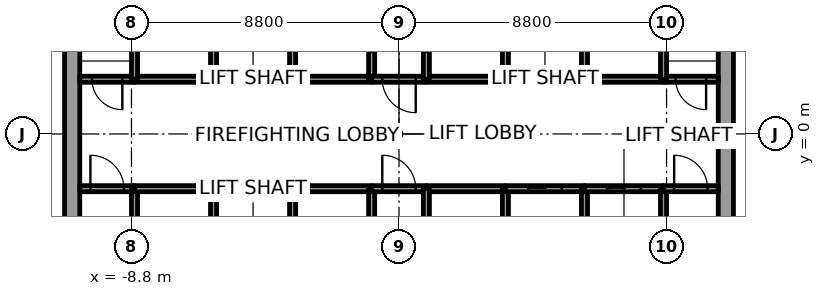
"""IFC4 building model, lengths in metres.
Left out: names, types, materials, properties, quantities, classifications, styles, units other than length and angle.
Written with IfcOpenShell. Run it as: python <this file> out.ifc"""

import sys

from ifc_helpers import new_model, si_unit, direction, frame, frame_2d, origin, place, context, subcontext, project, spatial, rectangle, extrude, element, fill, save


model = new_model("IFC4")
c1 = context("Model", 3, precision=1e-05, world=origin(), true_north=direction((0.0, 1.0)))
c2 = subcontext(c1, "Body", "Model", "MODEL_VIEW")
j1 = project(units=[si_unit("LENGTHUNIT", "METRE"), si_unit("PLANEANGLEUNIT", "RADIAN")], contexts=[c1])
p1 = place(None, origin())
s1 = spatial("IfcSite", under=j1, at=p1, CompositionType="ELEMENT")
p2 = place(p1, origin())
s2 = spatial("IfcBuilding", under=s1, at=p2, CompositionType="ELEMENT")
p3 = place(p2, frame((0.0, 0.0, -4.5)))
s3 = spatial("IfcBuildingStorey", under=s2, at=p3, CompositionType="ELEMENT", Elevation=-4.5)
for number, where, z_axis, x_axis in (
    (1, (-10.75, -7.5, 0.0), (0.0, 0.0, 1.0), (0.0, 1.0, 0.0)),
    (2, (10.75, -7.5, 0.0), (0.0, 0.0, 1.0), (0.0, 1.0, 0.0)),
):
    element("IfcWall", number, at=place(p3, frame(where, z_axis=z_axis, x_axis=x_axis)), inside=s3, PredefinedType="SHEAR", context=c2, shape_type="SweptSolid", body=[
        extrude(rectangle(XDim=15.0, YDim=0.5, at=frame_2d((7.5, 0.0))), origin(), (0.0, 0.0, 1.0), 4.5),
    ])
p4 = place(p3, frame((-10.5, -1.8, 0.0), z_axis=(0.0, 0.0, 1.0), x_axis=(1.0, 0.0, 0.0)))
e3 = element("IfcWall", 3, at=p4, inside=s3, PredefinedType="SOLIDWALL", context=c2, shape_type="SweptSolid", body=[
    extrude(rectangle(XDim=1.8, YDim=0.2, at=frame_2d((0.9, 0.0))), origin(), (0.0, 0.0, 1.0), 4.25),
])
p5 = place(p4, frame((0.35, 0.0, 0.0)))
e4 = element("IfcOpeningElement", 4, at=p5, cuts=e3, PredefinedType="OPENING", context=c2, shape_type="SweptSolid", body=[
    extrude(rectangle(XDim=1.1, YDim=2.4, at=frame_2d((0.55, 1.2))), frame((0.0, 0.1, 0.0), z_axis=(0.0, -1.0, 0.0), x_axis=(1.0, 0.0, 0.0)), (0.0, 0.0, 1.0), 0.2),
])
p6 = place(p3, frame((-8.7, 1.8, 0.0), z_axis=(0.0, 0.0, 1.0), x_axis=(-1.0, 0.0, 0.0)))
e5 = element("IfcWall", 5, at=p6, inside=s3, PredefinedType="SOLIDWALL", context=c2, shape_type="SweptSolid", body=[
    extrude(rectangle(XDim=1.8, YDim=0.2, at=frame_2d((0.9, 0.0))), origin(), (0.0, 0.0, 1.0), 4.25),
])
p7 = place(p6, frame((0.4, 0.0, 0.0)))
e6 = element("IfcOpeningElement", 6, at=p7, cuts=e5, PredefinedType="OPENING", context=c2, shape_type="SweptSolid", body=[
    extrude(rectangle(XDim=1.0, YDim=2.4, at=frame_2d((0.5, 1.2))), frame((0.0, 0.1, 0.0), z_axis=(0.0, -1.0, 0.0), x_axis=(1.0, 0.0, 0.0)), (0.0, 0.0, 1.0), 0.2),
])
p8 = place(p3, frame((-8.7, -4.6, 0.0), z_axis=(0.0, 0.0, 1.0), x_axis=(0.0, 1.0, 0.0)))
e7 = element("IfcWall", 7, at=p8, inside=s3, PredefinedType="SOLIDWALL", context=c2, shape_type="SweptSolid", body=[
    extrude(rectangle(XDim=2.8, YDim=0.2, at=frame_2d((1.4, 0.0))), origin(), (0.0, 0.0, 1.0), 4.25),
])
for number, where, z_axis, x_axis in (
    (8, (-8.7, -1.8, 0.0), (0.0, 0.0, 1.0), (1.0, 0.0, 0.0)),
    (9, (-6.1, 1.8, 0.0), (0.0, 0.0, 1.0), (-1.0, 0.0, 0.0)),
):
    element("IfcWall", number, at=place(p3, frame(where, z_axis=z_axis, x_axis=x_axis)), inside=s3, PredefinedType="SOLIDWALL", context=c2, shape_type="SweptSolid", body=[
        extrude(rectangle(XDim=2.6, YDim=0.2, at=frame_2d((1.3, 0.0))), origin(), (0.0, 0.0, 1.0), 4.25),
    ])
for number, where, z_axis, x_axis in (
    (10, (-8.7, 1.8, 0.0), (0.0, 0.0, 1.0), (0.0, 1.0, 0.0)),
    (11, (-6.1, -4.6, 0.0), (0.0, 0.0, 1.0), (0.0, 1.0, 0.0)),
):
    element("IfcWall", number, at=place(p3, frame(where, z_axis=z_axis, x_axis=x_axis)), inside=s3, PredefinedType="SOLIDWALL", context=c2, shape_type="SweptSolid", body=[
        extrude(rectangle(XDim=2.8, YDim=0.2, at=frame_2d((1.4, 0.0))), origin(), (0.0, 0.0, 1.0), 4.25),
    ])
for number, where, z_axis, x_axis in (
    (12, (-6.1, -1.8, 0.0), (0.0, 0.0, 1.0), (1.0, 0.0, 0.0)),
    (13, (-3.5, 1.8, 0.0), (0.0, 0.0, 1.0), (-1.0, 0.0, 0.0)),
):
    element("IfcWall", number, at=place(p3, frame(where, z_axis=z_axis, x_axis=x_axis)), inside=s3, PredefinedType="SOLIDWALL", context=c2, shape_type="SweptSolid", body=[
        extrude(rectangle(XDim=2.6, YDim=0.2, at=frame_2d((1.3, 0.0))), origin(), (0.0, 0.0, 1.0), 4.25),
    ])
for number, where, z_axis, x_axis in (
    (14, (-6.1, 1.8, 0.0), (0.0, 0.0, 1.0), (0.0, 1.0, 0.0)),
    (15, (-3.5, -4.6, 0.0), (0.0, 0.0, 1.0), (0.0, 1.0, 0.0)),
):
    element("IfcWall", number, at=place(p3, frame(where, z_axis=z_axis, x_axis=x_axis)), inside=s3, PredefinedType="SOLIDWALL", context=c2, shape_type="SweptSolid", body=[
        extrude(rectangle(XDim=2.8, YDim=0.2, at=frame_2d((1.4, 0.0))), origin(), (0.0, 0.0, 1.0), 4.25),
    ])
for number, where, z_axis, x_axis in (
    (16, (-3.5, -1.8, 0.0), (0.0, 0.0, 1.0), (1.0, 0.0, 0.0)),
    (17, (-0.9, 1.8, 0.0), (0.0, 0.0, 1.0), (-1.0, 0.0, 0.0)),
):
    element("IfcWall", number, at=place(p3, frame(where, z_axis=z_axis, x_axis=x_axis)), inside=s3, PredefinedType="SOLIDWALL", context=c2, shape_type="SweptSolid", body=[
        extrude(rectangle(XDim=2.6, YDim=0.2, at=frame_2d((1.3, 0.0))), origin(), (0.0, 0.0, 1.0), 4.25),
    ])
p9 = place(p3, frame((-3.5, 4.6, 0.0), z_axis=(0.0, 0.0, 1.0), x_axis=(0.0, -1.0, 0.0)))
e18 = element("IfcWall", 18, at=p9, inside=s3, PredefinedType="SOLIDWALL", context=c2, shape_type="SweptSolid", body=[
    extrude(rectangle(XDim=2.8, YDim=0.2, at=frame_2d((1.4, 0.0))), origin(), (0.0, 0.0, 1.0), 4.25),
])
p10 = place(p3, frame((-0.9, 1.8, 0.0), z_axis=(0.0, 0.0, 1.0), x_axis=(0.0, 1.0, 0.0)))
e19 = element("IfcWall", 19, at=p10, inside=s3, PredefinedType="SOLIDWALL", context=c2, shape_type="SweptSolid", body=[
    extrude(rectangle(XDim=3.0, YDim=0.2, at=frame_2d((1.5, 0.0))), origin(), (0.0, 0.0, 1.0), 4.25),
])
p11 = place(p10, frame((0.9, 0.0, 0.0)))
e20 = element("IfcOpeningElement", 20, at=p11, cuts=e19, PredefinedType="OPENING", context=c2, shape_type="SweptSolid", body=[
    extrude(rectangle(XDim=1.2, YDim=2.1, at=frame_2d((0.6, 1.05))), frame((0.0, 0.1, 0.0), z_axis=(0.0, -1.0, 0.0), x_axis=(1.0, 0.0, 0.0)), (0.0, 0.0, 1.0), 0.2),
])
p12 = place(p3, frame((-0.9, -4.6, 0.0), z_axis=(0.0, 0.0, 1.0), x_axis=(0.0, 1.0, 0.0)))
e21 = element("IfcWall", 21, at=p12, inside=s3, PredefinedType="SOLIDWALL", context=c2, shape_type="SweptSolid", body=[
    extrude(rectangle(XDim=2.8, YDim=0.2, at=frame_2d((1.4, 0.0))), origin(), (0.0, 0.0, 1.0), 4.25),
])
p13 = place(p3, frame((-0.9, -1.8, 0.0), z_axis=(0.0, 0.0, 1.0), x_axis=(1.0, 0.0, 0.0)))
e22 = element("IfcWall", 22, at=p13, inside=s3, PredefinedType="SOLIDWALL", context=c2, shape_type="SweptSolid", body=[
    extrude(rectangle(XDim=1.8, YDim=0.2, at=frame_2d((0.9, 0.0))), origin(), (0.0, 0.0, 1.0), 4.25),
])
p14 = place(p13, frame((0.35, 0.0, 0.0)))
e23 = element("IfcOpeningElement", 23, at=p14, cuts=e22, PredefinedType="OPENING", context=c2, shape_type="SweptSolid", body=[
    extrude(rectangle(XDim=1.1, YDim=2.4, at=frame_2d((0.55, 1.2))), frame((0.0, 0.1, 0.0), z_axis=(0.0, -1.0, 0.0), x_axis=(1.0, 0.0, 0.0)), (0.0, 0.0, 1.0), 0.2),
])
p15 = place(p3, frame((0.9, 1.8, 0.0), z_axis=(0.0, 0.0, 1.0), x_axis=(-1.0, 0.0, 0.0)))
e24 = element("IfcWall", 24, at=p15, inside=s3, PredefinedType="SOLIDWALL", context=c2, shape_type="SweptSolid", body=[
    extrude(rectangle(XDim=1.8, YDim=0.2, at=frame_2d((0.9, 0.0))), origin(), (0.0, 0.0, 1.0), 4.25),
])
p16 = place(p15, frame((0.35, 0.0, 0.0)))
e25 = element("IfcOpeningElement", 25, at=p16, cuts=e24, PredefinedType="OPENING", context=c2, shape_type="SweptSolid", body=[
    extrude(rectangle(XDim=1.1, YDim=2.4, at=frame_2d((0.55, 1.2))), frame((0.0, 0.1, 0.0), z_axis=(0.0, -1.0, 0.0), x_axis=(1.0, 0.0, 0.0)), (0.0, 0.0, 1.0), 0.2),
])
p17 = place(p3, frame((0.9, -1.8, 0.0), z_axis=(0.0, 0.0, 1.0), x_axis=(1.0, 0.0, 0.0)))
e26 = element("IfcWall", 26, at=p17, inside=s3, PredefinedType="SOLIDWALL", context=c2, shape_type="SweptSolid", body=[
    extrude(rectangle(XDim=2.6, YDim=0.2, at=frame_2d((1.3, 0.0))), origin(), (0.0, 0.0, 1.0), 4.25),
])
p18 = place(p3, frame((0.9, -1.8, 0.0), z_axis=(0.0, 0.0, 1.0), x_axis=(0.0, -1.0, 0.0)))
e27 = element("IfcWall", 27, at=p18, inside=s3, PredefinedType="SOLIDWALL", context=c2, shape_type="SweptSolid", body=[
    extrude(rectangle(XDim=2.8, YDim=0.2, at=frame_2d((1.4, 0.0))), origin(), (0.0, 0.0, 1.0), 4.25),
])
p19 = place(p3, frame((3.5, 1.8, 0.0), z_axis=(0.0, 0.0, 1.0), x_axis=(-1.0, 0.0, 0.0)))
e28 = element("IfcWall", 28, at=p19, inside=s3, PredefinedType="SOLIDWALL", context=c2, shape_type="SweptSolid", body=[
    extrude(rectangle(XDim=2.6, YDim=0.2, at=frame_2d((1.3, 0.0))), origin(), (0.0, 0.0, 1.0), 4.25),
])
p20 = place(p3, frame((0.9, 4.8, 0.0), z_axis=(0.0, 0.0, 1.0), x_axis=(0.0, -1.0, 0.0)))
e29 = element("IfcWall", 29, at=p20, inside=s3, PredefinedType="SOLIDWALL", context=c2, shape_type="SweptSolid", body=[
    extrude(rectangle(XDim=3.0, YDim=0.2, at=frame_2d((1.5, 0.0))), origin(), (0.0, 0.0, 1.0), 4.25),
])
p21 = place(p20, frame((0.9, 0.0, 0.0)))
e30 = element("IfcOpeningElement", 30, at=p21, cuts=e29, PredefinedType="OPENING", context=c2, shape_type="SweptSolid", body=[
    extrude(rectangle(XDim=1.2, YDim=2.1, at=frame_2d((0.6, 1.05))), frame((0.0, 0.1, 0.0), z_axis=(0.0, -1.0, 0.0), x_axis=(1.0, 0.0, 0.0)), (0.0, 0.0, 1.0), 0.2),
])
p22 = place(p3, frame((3.5, -4.6, 0.0), z_axis=(0.0, 0.0, 1.0), x_axis=(0.0, 1.0, 0.0)))
e31 = element("IfcWall", 31, at=p22, inside=s3, PredefinedType="SOLIDWALL", context=c2, shape_type="SweptSolid", body=[
    extrude(rectangle(XDim=2.8, YDim=0.2, at=frame_2d((1.4, 0.0))), origin(), (0.0, 0.0, 1.0), 4.25),
])
p23 = place(p3, frame((3.5, -1.8, 0.0), z_axis=(0.0, 0.0, 1.0), x_axis=(1.0, 0.0, 0.0)))
e32 = element("IfcWall", 32, at=p23, inside=s3, PredefinedType="SOLIDWALL", context=c2, shape_type="SweptSolid", body=[
    extrude(rectangle(XDim=2.6, YDim=0.2, at=frame_2d((1.3, 0.0))), origin(), (0.0, 0.0, 1.0), 4.25),
])
p24 = place(p23, frame((0.75, 0.0, 0.0)))
e33 = element("IfcOpeningElement", 33, at=p24, cuts=e32, PredefinedType="OPENING", context=c2, shape_type="SweptSolid", body=[
    extrude(rectangle(XDim=1.1, YDim=2.1, at=frame_2d((0.55, 1.05))), frame((0.0, 0.1, 0.0), z_axis=(0.0, -1.0, 0.0), x_axis=(1.0, 0.0, 0.0)), (0.0, 0.0, 1.0), 0.2),
])
p25 = place(p3, frame((6.1, 1.8, 0.0), z_axis=(0.0, 0.0, 1.0), x_axis=(-1.0, 0.0, 0.0)))
e34 = element("IfcWall", 34, at=p25, inside=s3, PredefinedType="SOLIDWALL", context=c2, shape_type="SweptSolid", body=[
    extrude(rectangle(XDim=2.6, YDim=0.2, at=frame_2d((1.3, 0.0))), origin(), (0.0, 0.0, 1.0), 4.25),
])
for number, where, z_axis, x_axis in (
    (35, (3.5, 1.8, 0.0), (0.0, 0.0, 1.0), (0.0, 1.0, 0.0)),
    (36, (6.1, -4.6, 0.0), (0.0, 0.0, 1.0), (0.0, 1.0, 0.0)),
):
    element("IfcWall", number, at=place(p3, frame(where, z_axis=z_axis, x_axis=x_axis)), inside=s3, PredefinedType="SOLIDWALL", context=c2, shape_type="SweptSolid", body=[
        extrude(rectangle(XDim=2.8, YDim=0.2, at=frame_2d((1.4, 0.0))), origin(), (0.0, 0.0, 1.0), 4.25),
    ])
p26 = place(p3, frame((6.1, -1.8, 0.0), z_axis=(0.0, 0.0, 1.0), x_axis=(1.0, 0.0, 0.0)))
e37 = element("IfcWall", 37, at=p26, inside=s3, PredefinedType="SOLIDWALL", context=c2, shape_type="SweptSolid", body=[
    extrude(rectangle(XDim=2.6, YDim=0.2, at=frame_2d((1.3, 0.0))), origin(), (0.0, 0.0, 1.0), 4.25),
])
p27 = place(p26, frame((0.75, 0.0, 0.0)))
e38 = element("IfcOpeningElement", 38, at=p27, cuts=e37, PredefinedType="OPENING", context=c2, shape_type="SweptSolid", body=[
    extrude(rectangle(XDim=1.1, YDim=2.1, at=frame_2d((0.55, 1.05))), frame((0.0, 0.1, 0.0), z_axis=(0.0, -1.0, 0.0), x_axis=(1.0, 0.0, 0.0)), (0.0, 0.0, 1.0), 0.2),
])
p28 = place(p3, frame((8.7, 1.8, 0.0), z_axis=(0.0, 0.0, 1.0), x_axis=(-1.0, 0.0, 0.0)))
e39 = element("IfcWall", 39, at=p28, inside=s3, PredefinedType="SOLIDWALL", context=c2, shape_type="SweptSolid", body=[
    extrude(rectangle(XDim=2.6, YDim=0.2, at=frame_2d((1.3, 0.0))), origin(), (0.0, 0.0, 1.0), 4.25),
])
for number, where, z_axis, x_axis in (
    (40, (6.1, 1.8, 0.0), (0.0, 0.0, 1.0), (0.0, 1.0, 0.0)),
    (41, (8.7, -1.8, 0.0), (0.0, 0.0, 1.0), (0.0, -1.0, 0.0)),
):
    element("IfcWall", number, at=place(p3, frame(where, z_axis=z_axis, x_axis=x_axis)), inside=s3, PredefinedType="SOLIDWALL", context=c2, shape_type="SweptSolid", body=[
        extrude(rectangle(XDim=2.8, YDim=0.2, at=frame_2d((1.4, 0.0))), origin(), (0.0, 0.0, 1.0), 4.25),
    ])
p29 = place(p3, frame((8.7, -1.8, 0.0), z_axis=(0.0, 0.0, 1.0), x_axis=(1.0, 0.0, 0.0)))
e42 = element("IfcWall", 42, at=p29, inside=s3, PredefinedType="SOLIDWALL", context=c2, shape_type="SweptSolid", body=[
    extrude(rectangle(XDim=1.8, YDim=0.2, at=frame_2d((0.9, 0.0))), origin(), (0.0, 0.0, 1.0), 4.25),
])
p30 = place(p29, frame((0.35, 0.0, 0.0)))
e43 = element("IfcOpeningElement", 43, at=p30, cuts=e42, PredefinedType="OPENING", context=c2, shape_type="SweptSolid", body=[
    extrude(rectangle(XDim=1.1, YDim=2.4, at=frame_2d((0.55, 1.2))), frame((0.0, 0.1, 0.0), z_axis=(0.0, -1.0, 0.0), x_axis=(1.0, 0.0, 0.0)), (0.0, 0.0, 1.0), 0.2),
])
p31 = place(p3, frame((10.5, 1.8, 0.0), z_axis=(0.0, 0.0, 1.0), x_axis=(-1.0, 0.0, 0.0)))
e44 = element("IfcWall", 44, at=p31, inside=s3, PredefinedType="SOLIDWALL", context=c2, shape_type="SweptSolid", body=[
    extrude(rectangle(XDim=1.8, YDim=0.2, at=frame_2d((0.9, 0.0))), origin(), (0.0, 0.0, 1.0), 4.25),
])
p32 = place(p31, frame((0.4, 0.0, 0.0)))
e45 = element("IfcOpeningElement", 45, at=p32, cuts=e44, PredefinedType="OPENING", context=c2, shape_type="SweptSolid", body=[
    extrude(rectangle(XDim=1.0, YDim=2.4, at=frame_2d((0.5, 1.2))), frame((0.0, 0.1, 0.0), z_axis=(0.0, -1.0, 0.0), x_axis=(1.0, 0.0, 0.0)), (0.0, 0.0, 1.0), 0.2),
])
p33 = place(p3, frame((8.7, 4.6, 0.0), z_axis=(0.0, 0.0, 1.0), x_axis=(0.0, -1.0, 0.0)))
e46 = element("IfcWall", 46, at=p33, inside=s3, PredefinedType="SOLIDWALL", context=c2, shape_type="SweptSolid", body=[
    extrude(rectangle(XDim=2.8, YDim=0.2, at=frame_2d((1.4, 0.0))), origin(), (0.0, 0.0, 1.0), 4.25),
])
p34 = place(p24, origin())
e47 = element("IfcDoor", 47, at=p34, inside=s3, OperationType="SLIDING_TO_RIGHT", PredefinedType="DOOR", context=c2, shape_type="SweptSolid", body=[
    extrude(rectangle(XDim=1.1, YDim=2.1, at=frame_2d((0.55, 1.05))), frame((0.0, 0.025, 0.0), z_axis=(0.0, -1.0, 0.0), x_axis=(1.0, 0.0, 0.0)), (0.0, 0.0, 1.0), 0.05),
])
fill(e33, e47)
p35 = place(p27, origin())
e48 = element("IfcDoor", 48, at=p35, inside=s3, OperationType="SLIDING_TO_RIGHT", PredefinedType="DOOR", context=c2, shape_type="SweptSolid", body=[
    extrude(rectangle(XDim=1.1, YDim=2.1, at=frame_2d((0.55, 1.05))), frame((0.0, 0.025, 0.0), z_axis=(0.0, -1.0, 0.0), x_axis=(1.0, 0.0, 0.0)), (0.0, 0.0, 1.0), 0.05),
])
fill(e38, e48)
p36 = place(p5, origin())
e49 = element("IfcDoor", 49, at=p36, inside=s3, OperationType="SINGLE_SWING_LEFT", PredefinedType="DOOR", context=c2, shape_type="SweptSolid", body=[
    extrude(rectangle(XDim=1.1, YDim=2.4, at=frame_2d((0.55, 1.2))), frame((0.0, 0.025, 0.0), z_axis=(0.0, -1.0, 0.0), x_axis=(1.0, 0.0, 0.0)), (0.0, 0.0, 1.0), 0.05),
])
fill(e4, e49)
p37 = place(p30, origin())
e50 = element("IfcDoor", 50, at=p37, inside=s3, OperationType="SINGLE_SWING_RIGHT", PredefinedType="DOOR", context=c2, shape_type="SweptSolid", body=[
    extrude(rectangle(XDim=1.1, YDim=2.4, at=frame_2d((0.55, 1.2))), frame((0.0, 0.025, 0.0), z_axis=(0.0, -1.0, 0.0), x_axis=(1.0, 0.0, 0.0)), (0.0, 0.0, 1.0), 0.05),
])
fill(e43, e50)
p38 = place(p16, origin())
e51 = element("IfcDoor", 51, at=p38, inside=s3, OperationType="SINGLE_SWING_RIGHT", PredefinedType="DOOR", context=c2, shape_type="SweptSolid", body=[
    extrude(rectangle(XDim=1.1, YDim=2.4, at=frame_2d((0.55, 1.2))), frame((0.0, 0.025, 0.0), z_axis=(0.0, -1.0, 0.0), x_axis=(1.0, 0.0, 0.0)), (0.0, 0.0, 1.0), 0.05),
])
fill(e25, e51)
p39 = place(p14, origin())
e52 = element("IfcDoor", 52, at=p39, inside=s3, OperationType="SINGLE_SWING_RIGHT", PredefinedType="DOOR", context=c2, shape_type="SweptSolid", body=[
    extrude(rectangle(XDim=1.1, YDim=2.4, at=frame_2d((0.55, 1.2))), frame((0.0, 0.025, 0.0), z_axis=(0.0, -1.0, 0.0), x_axis=(1.0, 0.0, 0.0)), (0.0, 0.0, 1.0), 0.05),
])
fill(e23, e52)
p40 = place(p7, origin())
e53 = element("IfcDoor", 53, at=p40, inside=s3, OperationType="SINGLE_SWING_RIGHT", PredefinedType="DOOR", context=c2, shape_type="SweptSolid", body=[
    extrude(rectangle(XDim=1.0, YDim=2.4, at=frame_2d((0.5, 1.2))), frame((0.0, 0.025, 0.0), z_axis=(0.0, -1.0, 0.0), x_axis=(1.0, 0.0, 0.0)), (0.0, 0.0, 1.0), 0.05),
])
fill(e6, e53)
p41 = place(p32, origin())
e54 = element("IfcDoor", 54, at=p41, inside=s3, OperationType="SINGLE_SWING_LEFT", PredefinedType="DOOR", context=c2, shape_type="SweptSolid", body=[
    extrude(rectangle(XDim=1.0, YDim=2.4, at=frame_2d((0.5, 1.2))), frame((0.0, 0.025, 0.0), z_axis=(0.0, -1.0, 0.0), x_axis=(1.0, 0.0, 0.0)), (0.0, 0.0, 1.0), 0.05),
])
fill(e45, e54)
save(model, sys.argv[1])
